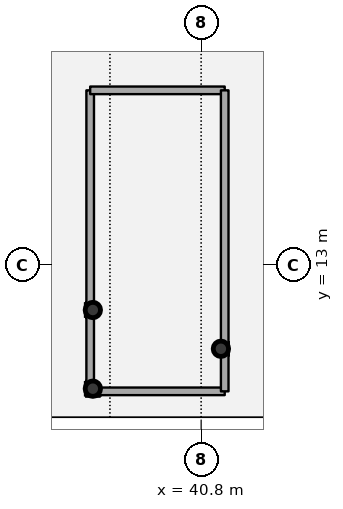
"""IFC4 building model, lengths in metres.
Left out: names, types, materials, properties, quantities, classifications, styles, units other than length and angle.
Written with IfcOpenShell. Run it as: python <this file> out.ifc"""

import sys

from ifc_helpers import new_model, si_unit, direction, frame, frame_2d, origin, origin_2d, place, context, subcontext, project, spatial, rectangle, hollow_circle, extrude, source, transform, mapped, element, fill, save


model = new_model("IFC4")
c1 = context("Model", 3, precision=1e-05, world=origin(), true_north=direction((0.0, 1.0)))
c2 = subcontext(c1, "Body", "Model", "MODEL_VIEW")
j1 = project(units=[si_unit("LENGTHUNIT", "METRE"), si_unit("PLANEANGLEUNIT", "RADIAN")], contexts=[c1])
p1 = place(None, origin())
s1 = spatial("IfcSite", under=j1, at=p1, CompositionType="ELEMENT")
p2 = place(p1, origin())
s2 = spatial("IfcBuilding", under=s1, at=p2, CompositionType="ELEMENT")
p3 = place(p2, frame((0.0, 0.0, -9.0)))
s3 = spatial("IfcBuildingStorey", under=s2, at=p3, CompositionType="ELEMENT", Elevation=-9.0)
for number, where, z_axis, x_axis in (
    (1, (37.95, 9.75, 0.0), (0.0, 0.0, 1.0), (1.0, 0.0, 0.0)),
    (2, (37.95, 11.82, 0.0), (0.0, 0.0, 1.0), (1.0, 0.0, 0.0)),
    (3, (41.32, 10.8, 0.0), (0.0, 0.0, 1.0), (1.0, 0.0, 0.0)),
):
    element("IfcColumn", number, at=place(p3, frame(where, z_axis=z_axis, x_axis=x_axis)), inside=s3, PredefinedType="COLUMN", context=c2, shape_type="SweptSolid", body=[
        extrude(hollow_circle(Radius=0.203, WallThickness=0.016, at=origin_2d()), origin(), (0.0, 0.0, 1.0), 4.5),
    ])
p4 = place(p3, frame((37.88, 9.68, 0.0), z_axis=(0.0, 0.0, 1.0), x_axis=(0.0, 1.0, 0.0)))
e4 = element("IfcWall", 4, at=p4, inside=s3, PredefinedType="PARTITIONING", context=c2, shape_type="SweptSolid", body=[
    extrude(rectangle(XDim=7.92, YDim=0.2, at=frame_2d((3.96, 0.0))), origin(), (0.0, 0.0, 1.0), 4.2),
])
p5 = place(p3, frame((37.88, 9.68, 0.0), z_axis=(0.0, 0.0, 1.0), x_axis=(1.0, 0.0, 0.0)))
e5 = element("IfcWall", 5, at=p5, inside=s3, PredefinedType="PARTITIONING", context=c2, shape_type="SweptSolid", body=[
    extrude(rectangle(XDim=3.54, YDim=0.2, at=frame_2d((1.77, 0.0))), origin(), (0.0, 0.0, 1.0), 4.2),
])
p6 = place(p3, frame((37.88, 17.6, 0.0), z_axis=(0.0, 0.0, 1.0), x_axis=(1.0, 0.0, 0.0)))
e6 = element("IfcWall", 6, at=p6, inside=s3, PredefinedType="PARTITIONING", context=c2, shape_type="SweptSolid", body=[
    extrude(rectangle(XDim=3.54, YDim=0.2, at=frame_2d((1.77, 0.0))), origin(), (0.0, 0.0, 1.0), 3.385),
])
p7 = place(p6, frame((1.17, 0.0, 0.0)))
e7 = element("IfcOpeningElement", 7, at=p7, cuts=e6, PredefinedType="OPENING", context=c2, shape_type="SweptSolid", body=[
    extrude(rectangle(XDim=1.2, YDim=2.15, at=origin_2d()), frame((0.6, 0.11, 1.075), z_axis=(0.0, -1.0, 0.0), x_axis=(1.0, 0.0, 0.0)), (0.0, 0.0, 1.0), 0.22),
])
p8 = place(p3, frame((41.42, 9.68, 0.0), z_axis=(0.0, 0.0, 1.0), x_axis=(0.0, 1.0, 0.0)))
e8 = element("IfcWall", 8, at=p8, inside=s3, PredefinedType="PARTITIONING", context=c2, shape_type="SweptSolid", body=[
    extrude(rectangle(XDim=7.92, YDim=0.2, at=frame_2d((3.96, 0.0))), origin(), (0.0, 0.0, 1.0), 3.385),
])
m1 = source(origin(), c2, "Body", "SweptSolid", [
    extrude(rectangle(XDim=1.2, YDim=2.15, at=origin_2d()), frame((0.6, 0.025, 1.075), z_axis=(0.0, -1.0, 0.0), x_axis=(1.0, 0.0, 0.0)), (0.0, 0.0, 1.0), 0.05),
])
p9 = place(p7, origin())
e9 = element("IfcDoor", 9, at=p9, inside=s3, OperationType="SINGLE_SWING_LEFT", PredefinedType="DOOR", context=c2, shape_type="MappedRepresentation", body=[
    mapped(m1, transform((0.0, 0.0, 0.0), x_axis=(1.0, 0.0, 0.0), y_axis=(0.0, 1.0, 0.0), z_axis=(0.0, 0.0, 1.0), scale=1.0)),
])
fill(e7, e9)
save(model, sys.argv[1])
